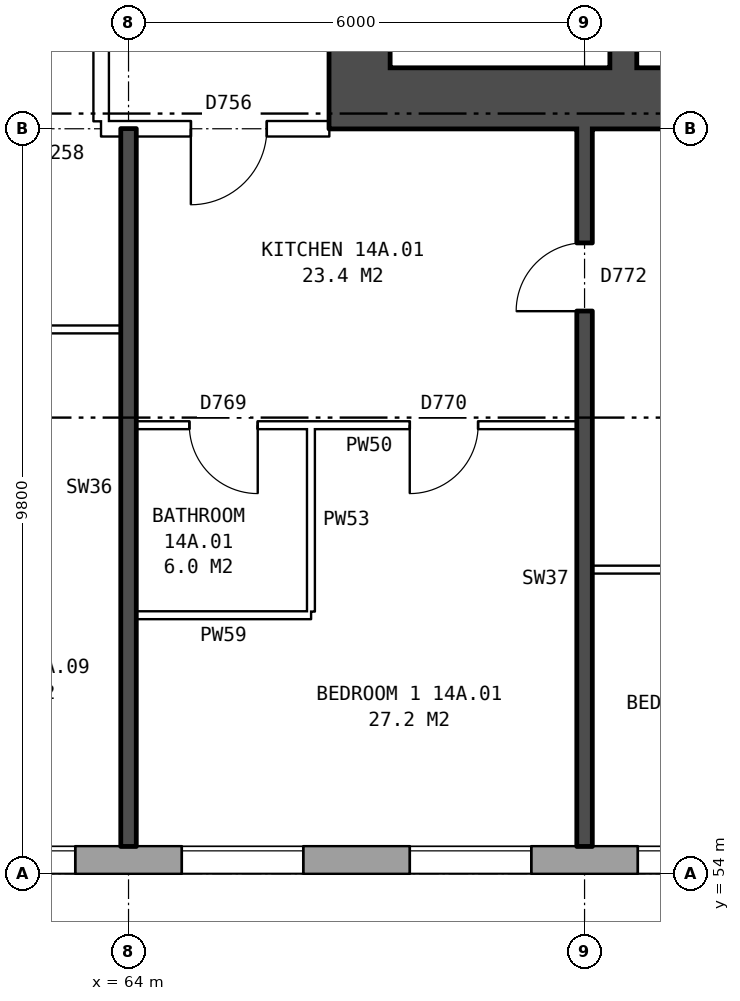
"""IFC4 building model, lengths in metres.
Left out: names, types, materials, properties, quantities, classifications, styles, units other than length and angle.
Written with IfcOpenShell. Run it as: python <this file> out.ifc"""

import sys

from ifc_helpers import new_model, si_unit, direction, frame, frame_2d, origin, place, context, subcontext, project, spatial, rectangle, extrude, element, fill, save


model = new_model("IFC4")
c1 = context("Model", 3, precision=1e-05, world=origin(), true_north=direction((0.0, 1.0)))
c2 = subcontext(c1, "Body", "Model", "MODEL_VIEW")
j1 = project(units=[si_unit("LENGTHUNIT", "METRE"), si_unit("PLANEANGLEUNIT", "RADIAN")], contexts=[c1])
p1 = place(None, origin())
s1 = spatial("IfcSite", under=j1, at=p1, CompositionType="ELEMENT")
p2 = place(p1, origin())
s2 = spatial("IfcBuilding", under=s1, at=p2, CompositionType="ELEMENT")
p3 = place(p2, frame((0.0, 0.0, 53.6)))
s3 = spatial("IfcBuildingStorey", under=s2, at=p3, CompositionType="ELEMENT", Elevation=53.6)
p4 = place(p3, frame((24.575, 54.18, 0.0), z_axis=(0.0, 0.0, 1.0), x_axis=(1.0, 0.0, 0.0)))
e1 = element("IfcWall", 1, at=p4, inside=s3, PredefinedType="STANDARD", context=c2, shape_type="SweptSolid", body=[
    extrude(rectangle(XDim=48.351, YDim=0.36, at=frame_2d((24.175, 0.0))), origin(), (0.0, 0.0, 1.0), 2.85),
])
p5 = place(p4, frame((1.125, 0.0, 0.8)))
e2 = element("IfcOpeningElement", 2, at=p5, cuts=e1, PredefinedType="OPENING", context=c2, shape_type="SweptSolid", body=[
    extrude(rectangle(XDim=1.6, YDim=1.8, at=frame_2d((0.8, 0.9))), frame((0.0, 0.19, 0.0), z_axis=(0.0, -1.0, 0.0), x_axis=(1.0, 0.0, 0.0)), (0.0, 0.0, 1.0), 0.38),
])
p6 = place(p4, frame((4.125, 0.0, 0.8)))
e3 = element("IfcOpeningElement", 3, at=p6, cuts=e1, PredefinedType="OPENING", context=c2, shape_type="SweptSolid", body=[
    extrude(rectangle(XDim=1.6, YDim=1.8, at=frame_2d((0.8, 0.9))), frame((0.0, 0.19, 0.0), z_axis=(0.0, -1.0, 0.0), x_axis=(1.0, 0.0, 0.0)), (0.0, 0.0, 1.0), 0.38),
])
p7 = place(p4, frame((7.125, 0.0, 0.8)))
e4 = element("IfcOpeningElement", 4, at=p7, cuts=e1, PredefinedType="OPENING", context=c2, shape_type="SweptSolid", body=[
    extrude(rectangle(XDim=1.6, YDim=1.8, at=frame_2d((0.8, 0.9))), frame((0.0, 0.19, 0.0), z_axis=(0.0, -1.0, 0.0), x_axis=(1.0, 0.0, 0.0)), (0.0, 0.0, 1.0), 0.38),
])
p8 = place(p4, frame((10.125, 0.0, 0.8)))
e5 = element("IfcOpeningElement", 5, at=p8, cuts=e1, PredefinedType="OPENING", context=c2, shape_type="SweptSolid", body=[
    extrude(rectangle(XDim=1.6, YDim=1.8, at=frame_2d((0.8, 0.9))), frame((0.0, 0.19, 0.0), z_axis=(0.0, -1.0, 0.0), x_axis=(1.0, 0.0, 0.0)), (0.0, 0.0, 1.0), 0.38),
])
p9 = place(p4, frame((12.025, 0.0, 1.7)))
e6 = element("IfcOpeningElement", 6, at=p9, cuts=e1, PredefinedType="OPENING", context=c2, shape_type="SweptSolid", body=[
    extrude(rectangle(XDim=0.8, YDim=0.9, at=frame_2d((0.4, 0.45))), frame((0.0, 0.19, 0.0), z_axis=(0.0, -1.0, 0.0), x_axis=(1.0, 0.0, 0.0)), (0.0, 0.0, 1.0), 0.38),
])
p10 = place(p4, frame((16.125, 0.0, 0.8)))
e7 = element("IfcOpeningElement", 7, at=p10, cuts=e1, PredefinedType="OPENING", context=c2, shape_type="SweptSolid", body=[
    extrude(rectangle(XDim=1.6, YDim=1.8, at=frame_2d((0.8, 0.9))), frame((0.0, 0.19, 0.0), z_axis=(0.0, -1.0, 0.0), x_axis=(1.0, 0.0, 0.0)), (0.0, 0.0, 1.0), 0.38),
])
p11 = place(p4, frame((19.125, 0.0, 0.8)))
e8 = element("IfcOpeningElement", 8, at=p11, cuts=e1, PredefinedType="OPENING", context=c2, shape_type="SweptSolid", body=[
    extrude(rectangle(XDim=1.6, YDim=1.8, at=frame_2d((0.8, 0.9))), frame((0.0, 0.19, 0.0), z_axis=(0.0, -1.0, 0.0), x_axis=(1.0, 0.0, 0.0)), (0.0, 0.0, 1.0), 0.38),
])
p12 = place(p4, frame((22.125, 0.0, 0.8)))
e9 = element("IfcOpeningElement", 9, at=p12, cuts=e1, PredefinedType="OPENING", context=c2, shape_type="SweptSolid", body=[
    extrude(rectangle(XDim=1.6, YDim=1.8, at=frame_2d((0.8, 0.9))), frame((0.0, 0.19, 0.0), z_axis=(0.0, -1.0, 0.0), x_axis=(1.0, 0.0, 0.0)), (0.0, 0.0, 1.0), 0.38),
])
p13 = place(p4, frame((25.125, 0.0, 0.8)))
e10 = element("IfcOpeningElement", 10, at=p13, cuts=e1, PredefinedType="OPENING", context=c2, shape_type="SweptSolid", body=[
    extrude(rectangle(XDim=1.6, YDim=1.8, at=frame_2d((0.8, 0.9))), frame((0.0, 0.19, 0.0), z_axis=(0.0, -1.0, 0.0), x_axis=(1.0, 0.0, 0.0)), (0.0, 0.0, 1.0), 0.38),
])
p14 = place(p4, frame((28.125, 0.0, 0.8)))
e11 = element("IfcOpeningElement", 11, at=p14, cuts=e1, PredefinedType="OPENING", context=c2, shape_type="SweptSolid", body=[
    extrude(rectangle(XDim=1.6, YDim=1.8, at=frame_2d((0.8, 0.9))), frame((0.0, 0.19, 0.0), z_axis=(0.0, -1.0, 0.0), x_axis=(1.0, 0.0, 0.0)), (0.0, 0.0, 1.0), 0.38),
])
p15 = place(p4, frame((31.125, 0.0, 0.8)))
e12 = element("IfcOpeningElement", 12, at=p15, cuts=e1, PredefinedType="OPENING", context=c2, shape_type="SweptSolid", body=[
    extrude(rectangle(XDim=1.6, YDim=1.8, at=frame_2d((0.8, 0.9))), frame((0.0, 0.19, 0.0), z_axis=(0.0, -1.0, 0.0), x_axis=(1.0, 0.0, 0.0)), (0.0, 0.0, 1.0), 0.38),
])
p16 = place(p4, frame((33.625, 0.0, 0.15)))
e13 = element("IfcOpeningElement", 13, at=p16, cuts=e1, PredefinedType="OPENING", context=c2, shape_type="SweptSolid", body=[
    extrude(rectangle(XDim=1.4, YDim=0.9, at=frame_2d((0.7, 0.45))), frame((0.0, 0.19, 0.0), z_axis=(0.0, -1.0, 0.0), x_axis=(1.0, 0.0, 0.0)), (0.0, 0.0, 1.0), 0.38),
])
p17 = place(p4, frame((37.125, 0.0, 0.8)))
e14 = element("IfcOpeningElement", 14, at=p17, cuts=e1, PredefinedType="OPENING", context=c2, shape_type="SweptSolid", body=[
    extrude(rectangle(XDim=1.6, YDim=1.8, at=frame_2d((0.8, 0.9))), frame((0.0, 0.19, 0.0), z_axis=(0.0, -1.0, 0.0), x_axis=(1.0, 0.0, 0.0)), (0.0, 0.0, 1.0), 0.38),
])
p18 = place(p4, frame((40.125, 0.0, 0.8)))
e15 = element("IfcOpeningElement", 15, at=p18, cuts=e1, PredefinedType="OPENING", context=c2, shape_type="SweptSolid", body=[
    extrude(rectangle(XDim=1.6, YDim=1.8, at=frame_2d((0.8, 0.9))), frame((0.0, 0.19, 0.0), z_axis=(0.0, -1.0, 0.0), x_axis=(1.0, 0.0, 0.0)), (0.0, 0.0, 1.0), 0.38),
])
p19 = place(p4, frame((43.125, 0.0, 0.8)))
e16 = element("IfcOpeningElement", 16, at=p19, cuts=e1, PredefinedType="OPENING", context=c2, shape_type="SweptSolid", body=[
    extrude(rectangle(XDim=1.6, YDim=1.8, at=frame_2d((0.8, 0.9))), frame((0.0, 0.19, 0.0), z_axis=(0.0, -1.0, 0.0), x_axis=(1.0, 0.0, 0.0)), (0.0, 0.0, 1.0), 0.38),
])
p20 = place(p4, frame((46.125, 0.0, 0.8)))
e17 = element("IfcOpeningElement", 17, at=p20, cuts=e1, PredefinedType="OPENING", context=c2, shape_type="SweptSolid", body=[
    extrude(rectangle(XDim=1.6, YDim=1.8, at=frame_2d((0.8, 0.9))), frame((0.0, 0.19, 0.0), z_axis=(0.0, -1.0, 0.0), x_axis=(1.0, 0.0, 0.0)), (0.0, 0.0, 1.0), 0.38),
])
p21 = place(p4, frame((14.325, 0.0, 0.8)))
e18 = element("IfcOpeningElement", 18, at=p21, cuts=e1, PredefinedType="OPENING", context=c2, shape_type="SweptSolid", body=[
    extrude(rectangle(XDim=0.8, YDim=0.9, at=frame_2d((0.4, 0.45))), frame((0.0, 0.19, 0.0), z_axis=(0.0, -1.0, 0.0), x_axis=(1.0, 0.0, 0.0)), (0.0, 0.0, 1.0), 0.38),
])
p22 = place(p4, frame((35.525, 0.0, 1.65)))
e19 = element("IfcOpeningElement", 19, at=p22, cuts=e1, PredefinedType="OPENING", context=c2, shape_type="SweptSolid", body=[
    extrude(rectangle(XDim=0.6, YDim=0.9, at=frame_2d((0.3, 0.45))), frame((0.0, 0.19, 0.0), z_axis=(0.0, -1.0, 0.0), x_axis=(1.0, 0.0, 0.0)), (0.0, 0.0, 1.0), 0.38),
])
p23 = place(p3, frame((67.04, 64.6, 0.0), z_axis=(0.0, 0.0, 1.0), x_axis=(0.0, 1.0, 0.0)))
e20 = element("IfcWall", 20, at=p23, inside=s3, PredefinedType="SHEAR", context=c2, shape_type="SweptSolid", body=[
    extrude(rectangle(XDim=10.8, YDim=0.8, at=frame_2d((5.4, 0.0))), origin(), (0.0, 0.0, 1.0), 2.85),
])
p24 = place(p23, frame((0.525, 0.0, 0.0)))
e21 = element("IfcOpeningElement", 21, at=p24, cuts=e20, PredefinedType="OPENING", context=c2, shape_type="SweptSolid", body=[
    extrude(rectangle(XDim=1.1, YDim=2.1, at=frame_2d((0.55, 1.05))), frame((0.0, 0.41, 0.0), z_axis=(0.0, -1.0, 0.0), x_axis=(1.0, 0.0, 0.0)), (0.0, 0.0, 1.0), 0.82),
])
p25 = place(p23, frame((9.1, 0.0, 0.0)))
e22 = element("IfcOpeningElement", 22, at=p25, cuts=e20, PredefinedType="OPENING", context=c2, shape_type="SweptSolid", body=[
    extrude(rectangle(XDim=1.1, YDim=2.1, at=frame_2d((0.55, 1.05))), frame((0.0, 0.41, 0.0), z_axis=(0.0, -1.0, 0.0), x_axis=(1.0, 0.0, 0.0)), (0.0, 0.0, 1.0), 0.82),
])
p26 = place(p3, frame((66.64, 64.2, 0.0), z_axis=(0.0, 0.0, 1.0), x_axis=(1.0, 0.0, 0.0)))
e23 = element("IfcWall", 23, at=p26, inside=s3, PredefinedType="SHEAR", context=c2, shape_type="SweptSolid", body=[
    extrude(rectangle(XDim=9.0, YDim=0.8, at=frame_2d((4.5, 0.0))), origin(), (0.0, 0.0, 1.0), 2.85),
])
p27 = place(p3, frame((70.51, 64.6, 0.0), z_axis=(0.0, 0.0, 1.0), x_axis=(0.0, 1.0, 0.0)))
e24 = element("IfcWall", 24, at=p27, inside=s3, PredefinedType="SHEAR", context=c2, shape_type="SweptSolid", body=[
    extrude(rectangle(XDim=2.075, YDim=0.35, at=frame_2d((1.038, 0.0))), origin(), (0.0, 0.0, 1.0), 2.85),
])
p28 = place(p3, frame((63.64, 63.9, 0.0), z_axis=(0.0, 0.0, 1.0), x_axis=(0.0, 1.0, 0.0)))
e25 = element("IfcWall", 25, at=p28, inside=s3, PredefinedType="PARTITIONING", context=c2, shape_type="SweptSolid", body=[
    extrude(rectangle(XDim=12.2, YDim=0.2, at=frame_2d((6.1, 0.0))), origin(), (0.0, 0.0, 1.0), 2.85),
])
p29 = place(p28, frame((5.1, 0.0, 0.0)))
e26 = element("IfcOpeningElement", 26, at=p29, cuts=e25, PredefinedType="OPENING", context=c2, shape_type="SweptSolid", body=[
    extrude(rectangle(XDim=2.0, YDim=2.1, at=frame_2d((1.0, 1.05))), frame((0.0, 0.11, 0.0), z_axis=(0.0, -1.0, 0.0), x_axis=(1.0, 0.0, 0.0)), (0.0, 0.0, 1.0), 0.22),
])
p30 = place(p3, frame((64.1, 57.4, 0.0), z_axis=(0.0, 0.0, 1.0), x_axis=(1.0, 0.0, 0.0)))
e27 = element("IfcWall", 27, at=p30, inside=s3, PredefinedType="PARTITIONING", context=c2, shape_type="SweptSolid", body=[
    extrude(rectangle(XDim=2.3, YDim=0.1, at=frame_2d((1.15, 0.0))), origin(), (0.0, 0.0, 1.0), 2.85),
])
p31 = place(p3, frame((70.1, 58.0, 0.0), z_axis=(0.0, 0.0, 1.0), x_axis=(1.0, 0.0, 0.0)))
e28 = element("IfcWall", 28, at=p31, inside=s3, PredefinedType="PARTITIONING", context=c2, shape_type="SweptSolid", body=[
    extrude(rectangle(XDim=5.54, YDim=0.1, at=frame_2d((2.77, 0.0))), origin(), (0.0, 0.0, 1.0), 2.85),
])
p32 = place(p31, frame((2.32, 0.0, 0.0)))
e29 = element("IfcOpeningElement", 29, at=p32, cuts=e28, PredefinedType="OPENING", context=c2, shape_type="SweptSolid", body=[
    extrude(rectangle(XDim=0.9, YDim=2.1, at=frame_2d((0.45, 1.05))), frame((0.0, 0.06, 0.0), z_axis=(0.0, -1.0, 0.0), x_axis=(1.0, 0.0, 0.0)), (0.0, 0.0, 1.0), 0.12),
])
p33 = place(p3, frame((64.1, 59.9, 0.0), z_axis=(0.0, 0.0, 1.0), x_axis=(1.0, 0.0, 0.0)))
e30 = element("IfcWall", 30, at=p33, inside=s3, PredefinedType="PARTITIONING", context=c2, shape_type="SweptSolid", body=[
    extrude(rectangle(XDim=5.8, YDim=0.1, at=frame_2d((2.9, 0.0))), origin(), (0.0, 0.0, 1.0), 2.85),
])
p34 = place(p33, frame((3.6, 0.0, 0.0)))
e31 = element("IfcOpeningElement", 31, at=p34, cuts=e30, PredefinedType="OPENING", context=c2, shape_type="SweptSolid", body=[
    extrude(rectangle(XDim=0.9, YDim=2.1, at=frame_2d((0.45, 1.05))), frame((0.0, 0.06, 0.0), z_axis=(0.0, -1.0, 0.0), x_axis=(1.0, 0.0, 0.0)), (0.0, 0.0, 1.0), 0.12),
])
p35 = place(p33, frame((0.7, 0.0, 0.0)))
e32 = element("IfcOpeningElement", 32, at=p35, cuts=e30, PredefinedType="OPENING", context=c2, shape_type="SweptSolid", body=[
    extrude(rectangle(XDim=0.9, YDim=2.1, at=frame_2d((0.45, 1.05))), frame((0.0, 0.06, 0.0), z_axis=(0.0, -1.0, 0.0), x_axis=(1.0, 0.0, 0.0)), (0.0, 0.0, 1.0), 0.12),
])
p36 = place(p3, frame((61.0, 61.16, 0.0), z_axis=(0.0, 0.0, 1.0), x_axis=(1.0, 0.0, 0.0)))
e33 = element("IfcWall", 33, at=p36, inside=s3, PredefinedType="PARTITIONING", context=c2, shape_type="SweptSolid", body=[
    extrude(rectangle(XDim=2.9, YDim=0.1, at=frame_2d((1.45, 0.0))), origin(), (0.0, 0.0, 1.0), 2.85),
])
p37 = place(p36, frame((1.0, 0.0, 0.0)))
e34 = element("IfcOpeningElement", 34, at=p37, cuts=e33, PredefinedType="OPENING", context=c2, shape_type="SweptSolid", body=[
    extrude(rectangle(XDim=0.9, YDim=2.1, at=frame_2d((0.45, 1.05))), frame((0.0, 0.06, 0.0), z_axis=(0.0, -1.0, 0.0), x_axis=(1.0, 0.0, 0.0)), (0.0, 0.0, 1.0), 0.12),
])
p38 = place(p3, frame((63.64, 63.8, 0.0), z_axis=(0.0, 0.0, 1.0), x_axis=(1.0, 0.0, 0.0)))
e35 = element("IfcWall", 35, at=p38, inside=s3, PredefinedType="PARTITIONING", context=c2, shape_type="SweptSolid", body=[
    extrude(rectangle(XDim=3.0, YDim=0.2, at=frame_2d((1.5, 0.0))), origin(), (0.0, 0.0, 1.0), 2.85),
])
p39 = place(p38, frame((1.18, 0.0, 0.0)))
e36 = element("IfcOpeningElement", 36, at=p39, cuts=e35, PredefinedType="OPENING", context=c2, shape_type="SweptSolid", body=[
    extrude(rectangle(XDim=1.0, YDim=2.1, at=frame_2d((0.5, 1.05))), frame((0.0, 0.11, 0.0), z_axis=(0.0, -1.0, 0.0), x_axis=(1.0, 0.0, 0.0)), (0.0, 0.0, 1.0), 0.22),
])
p40 = place(p3, frame((64.0, 54.36, 0.0), z_axis=(0.0, 0.0, 1.0), x_axis=(0.0, 1.0, 0.0)))
e37 = element("IfcWall", 37, at=p40, inside=s3, PredefinedType="SOLIDWALL", context=c2, shape_type="SweptSolid", body=[
    extrude(rectangle(XDim=9.44, YDim=0.2, at=frame_2d((4.72, 0.0))), origin(), (0.0, 0.0, 1.0), 2.85),
])
p41 = place(p3, frame((66.4, 57.45, 0.0), z_axis=(0.0, 0.0, 1.0), x_axis=(0.0, 1.0, 0.0)))
e38 = element("IfcWall", 38, at=p41, inside=s3, PredefinedType="PARTITIONING", context=c2, shape_type="SweptSolid", body=[
    extrude(rectangle(XDim=2.4, YDim=0.1, at=frame_2d((1.2, 0.0))), origin(), (0.0, 0.0, 1.0), 2.85),
])
p42 = place(p3, frame((70.0, 54.36, 0.0), z_axis=(0.0, 0.0, 1.0), x_axis=(0.0, 1.0, 0.0)))
e39 = element("IfcWall", 39, at=p42, inside=s3, PredefinedType="SOLIDWALL", context=c2, shape_type="SweptSolid", body=[
    extrude(rectangle(XDim=9.44, YDim=0.2, at=frame_2d((4.72, 0.0))), origin(), (0.0, 0.0, 1.0), 2.85),
])
p43 = place(p42, frame((7.04, 0.0, 0.0)))
e40 = element("IfcOpeningElement", 40, at=p43, cuts=e39, PredefinedType="OPENING", context=c2, shape_type="SweptSolid", body=[
    extrude(rectangle(XDim=0.9, YDim=2.1, at=frame_2d((0.45, 1.05))), frame((0.0, 0.11, 0.0), z_axis=(0.0, -1.0, 0.0), x_axis=(1.0, 0.0, 0.0)), (0.0, 0.0, 1.0), 0.22),
])
p44 = place(p17, origin())
e41 = element("IfcWindow", 41, at=p44, inside=s3, PartitioningType="SINGLE_PANEL", PredefinedType="WINDOW", context=c2, shape_type="SweptSolid", body=[
    extrude(rectangle(XDim=1.6, YDim=1.8, at=frame_2d((0.8, 0.9))), frame((0.0, 0.15, 0.0), z_axis=(0.0, -1.0, 0.0), x_axis=(1.0, 0.0, 0.0)), (0.0, 0.0, 1.0), 0.06),
])
fill(e14, e41)
p45 = place(p18, origin())
e42 = element("IfcWindow", 42, at=p45, inside=s3, PartitioningType="SINGLE_PANEL", PredefinedType="WINDOW", context=c2, shape_type="SweptSolid", body=[
    extrude(rectangle(XDim=1.6, YDim=1.8, at=frame_2d((0.8, 0.9))), frame((0.0, 0.15, 0.0), z_axis=(0.0, -1.0, 0.0), x_axis=(1.0, 0.0, 0.0)), (0.0, 0.0, 1.0), 0.06),
])
fill(e15, e42)
p46 = place(p19, origin())
e43 = element("IfcWindow", 43, at=p46, inside=s3, PartitioningType="SINGLE_PANEL", PredefinedType="WINDOW", context=c2, shape_type="SweptSolid", body=[
    extrude(rectangle(XDim=1.6, YDim=1.8, at=frame_2d((0.8, 0.9))), frame((0.0, 0.15, 0.0), z_axis=(0.0, -1.0, 0.0), x_axis=(1.0, 0.0, 0.0)), (0.0, 0.0, 1.0), 0.06),
])
fill(e16, e43)
p47 = place(p20, origin())
e44 = element("IfcWindow", 44, at=p47, inside=s3, PartitioningType="SINGLE_PANEL", PredefinedType="WINDOW", context=c2, shape_type="SweptSolid", body=[
    extrude(rectangle(XDim=1.6, YDim=1.8, at=frame_2d((0.8, 0.9))), frame((0.0, 0.15, 0.0), z_axis=(0.0, -1.0, 0.0), x_axis=(1.0, 0.0, 0.0)), (0.0, 0.0, 1.0), 0.06),
])
fill(e17, e44)
p48 = place(p34, frame((0.9, 0.0, 0.0), z_axis=(0.0, 0.0, 1.0), x_axis=(-1.0, 0.0, 0.0)))
e45 = element("IfcDoor", 45, at=p48, inside=s3, OperationType="SINGLE_SWING_RIGHT", PredefinedType="DOOR", context=c2, shape_type="SweptSolid", body=[
    extrude(rectangle(XDim=0.9, YDim=2.1, at=frame_2d((0.45, 1.05))), frame((0.0, 0.025, 0.0), z_axis=(0.0, -1.0, 0.0), x_axis=(1.0, 0.0, 0.0)), (0.0, 0.0, 1.0), 0.05),
])
fill(e31, e45)
p49 = place(p39, frame((1.0, 0.0, 0.0), z_axis=(0.0, 0.0, 1.0), x_axis=(-1.0, 0.0, 0.0)))
e46 = element("IfcDoor", 46, at=p49, inside=s3, OperationType="SINGLE_SWING_RIGHT", PredefinedType="DOOR", context=c2, shape_type="SweptSolid", body=[
    extrude(rectangle(XDim=1.0, YDim=2.1, at=frame_2d((0.5, 1.05))), frame((0.0, 0.025, 0.0), z_axis=(0.0, -1.0, 0.0), x_axis=(1.0, 0.0, 0.0)), (0.0, 0.0, 1.0), 0.05),
])
fill(e36, e46)
p50 = place(p43, origin())
e47 = element("IfcDoor", 47, at=p50, inside=s3, OperationType="SINGLE_SWING_LEFT", PredefinedType="DOOR", context=c2, shape_type="SweptSolid", body=[
    extrude(rectangle(XDim=0.9, YDim=2.1, at=frame_2d((0.45, 1.05))), frame((0.0, 0.025, 0.0), z_axis=(0.0, -1.0, 0.0), x_axis=(1.0, 0.0, 0.0)), (0.0, 0.0, 1.0), 0.05),
])
fill(e40, e47)
p51 = place(p35, frame((0.9, 0.0, 0.0), z_axis=(0.0, 0.0, 1.0), x_axis=(-1.0, 0.0, 0.0)))
e48 = element("IfcDoor", 48, at=p51, inside=s3, OperationType="SINGLE_SWING_LEFT", PredefinedType="DOOR", context=c2, shape_type="SweptSolid", body=[
    extrude(rectangle(XDim=0.9, YDim=2.1, at=frame_2d((0.45, 1.05))), frame((0.0, 0.025, 0.0), z_axis=(0.0, -1.0, 0.0), x_axis=(1.0, 0.0, 0.0)), (0.0, 0.0, 1.0), 0.05),
])
fill(e32, e48)
save(model, sys.argv[1])
